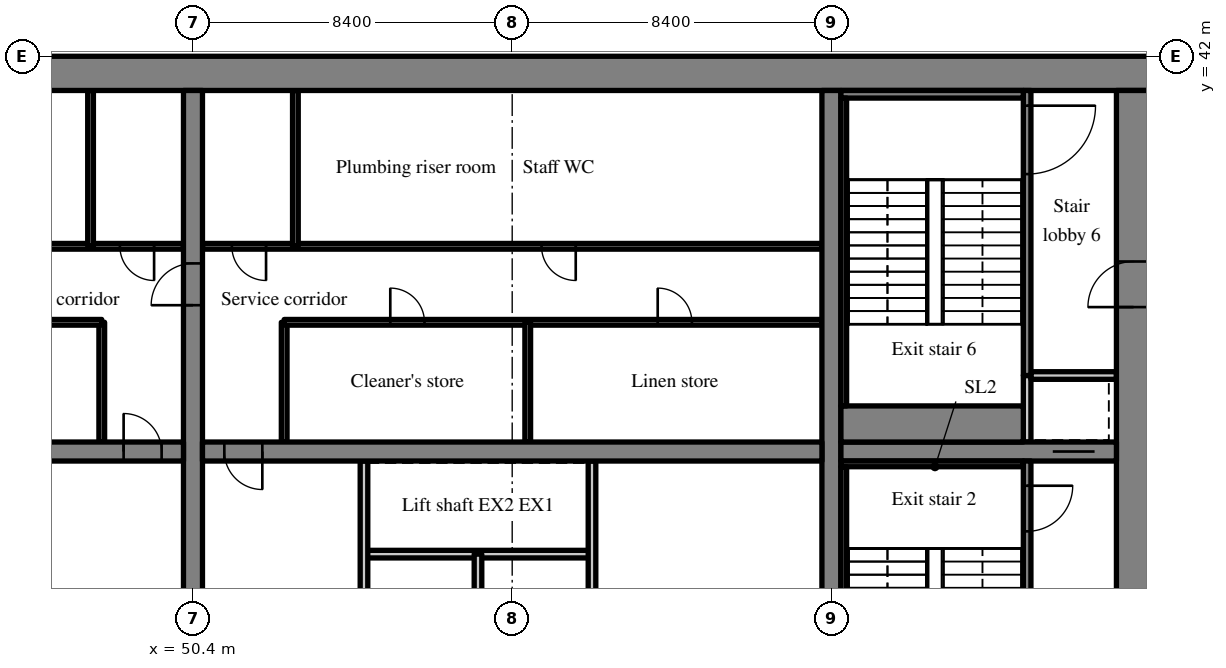
"""IFC4 building model, lengths in metres.
Left out: names, types, materials, properties, quantities, classifications, styles, units other than length and angle.
Written with IfcOpenShell. Run it as: python <this file> out.ifc"""

import sys

from ifc_helpers import new_model, si_unit, direction, frame, frame_2d, origin, place, context, subcontext, project, spatial, rectangle, extrude, source, transform, mapped, element, fill, save


model = new_model("IFC4")
c1 = context("Model", 3, precision=1e-05, world=origin(), true_north=direction((0.0, 1.0)))
c2 = subcontext(c1, "Body", "Model", "MODEL_VIEW")
j1 = project(units=[si_unit("LENGTHUNIT", "METRE"), si_unit("PLANEANGLEUNIT", "RADIAN")], contexts=[c1])
p1 = place(None, origin())
s1 = spatial("IfcSite", under=j1, at=p1, CompositionType="ELEMENT")
p2 = place(p1, origin())
s2 = spatial("IfcBuilding", under=s1, at=p2, CompositionType="ELEMENT")
p3 = place(p2, frame((0.0, 0.0, 125.6)))
s3 = spatial("IfcBuildingStorey", under=s2, at=p3, CompositionType="ELEMENT", Elevation=125.6)
m1 = source(origin(), c2, "Body", "SweptSolid", [
    extrude(rectangle(XDim=50.4, YDim=0.9, at=frame_2d((25.2, 0.0))), origin(), (0.0, 0.0, 1.0), 3.52),
])
p4 = place(p3, frame((25.2, 41.55, 0.0), z_axis=(0.0, 0.0, 1.0), x_axis=(1.0, 0.0, 0.0)))
e1 = element("IfcWall", 1, at=p4, inside=s3, PredefinedType="SHEAR", context=c2, shape_type="MappedRepresentation", body=[
    mapped(m1, transform((0.0, 0.0, 0.0), scale=1.0)),
])
m2 = source(origin(), c2, "Body", "SweptSolid", [
    extrude(rectangle(XDim=18.2, YDim=0.9, at=frame_2d((9.1, 0.0))), origin(), (0.0, 0.0, 1.0), 3.52),
])
p5 = place(p3, frame((75.15, 22.9, 0.0), z_axis=(0.0, 0.0, 1.0), x_axis=(0.0, 1.0, 0.0)))
e2 = element("IfcWall", 2, at=p5, inside=s3, PredefinedType="SHEAR", context=c2, shape_type="MappedRepresentation", body=[
    mapped(m2, transform((0.0, 0.0, 0.0), scale=1.0)),
])
m3 = source(origin(), c2, "Body", "SweptSolid", [
    extrude(rectangle(XDim=1.2, YDim=2.1, at=frame_2d((0.6, 1.05))), frame((0.0, 0.46, 0.0), z_axis=(0.0, -1.0, 0.0), x_axis=(1.0, 0.0, 0.0)), (0.0, 0.0, 1.0), 0.92),
])
p6 = place(p5, frame((12.5, 0.0, 0.0)))
e3 = element("IfcOpeningElement", 3, at=p6, cuts=e2, PredefinedType="OPENING", context=c2, shape_type="MappedRepresentation", body=[
    mapped(m3, transform((0.0, 0.0, 0.0), scale=1.0)),
])
m4 = source(origin(), c2, "Body", "SweptSolid", [
    extrude(rectangle(XDim=18.2, YDim=0.5, at=frame_2d((9.1, 0.0))), origin(), (0.0, 0.0, 1.0), 3.52),
])
p7 = place(p3, frame((50.4, 22.9, 0.0), z_axis=(0.0, 0.0, 1.0), x_axis=(0.0, 1.0, 0.0)))
e4 = element("IfcWall", 4, at=p7, inside=s3, PredefinedType="SHEAR", context=c2, shape_type="MappedRepresentation", body=[
    mapped(m4, transform((0.0, 0.0, 0.0), scale=1.0)),
])
m5 = source(origin(), c2, "Body", "SweptSolid", [
    extrude(rectangle(XDim=1.1, YDim=2.1, at=frame_2d((0.55, 1.05))), frame((0.0, 0.26, 0.0), z_axis=(0.0, -1.0, 0.0), x_axis=(1.0, 0.0, 0.0)), (0.0, 0.0, 1.0), 0.52),
])
p8 = place(p7, frame((12.55, 0.0, 0.0)))
e5 = element("IfcOpeningElement", 5, at=p8, cuts=e4, PredefinedType="OPENING", context=c2, shape_type="MappedRepresentation", body=[
    mapped(m5, transform((0.0, 0.0, 0.0), scale=1.0)),
])
p9 = place(p3, frame((67.2, 22.9, 0.0), z_axis=(0.0, 0.0, 1.0), x_axis=(0.0, 1.0, 0.0)))
e6 = element("IfcWall", 6, at=p9, inside=s3, PredefinedType="SHEAR", context=c2, shape_type="MappedRepresentation", body=[
    mapped(m4, transform((0.0, 0.0, 0.0), scale=1.0)),
])
m6 = source(origin(), c2, "Body", "SweptSolid", [
    extrude(rectangle(XDim=16.3, YDim=0.5, at=frame_2d((8.15, 0.0))), origin(), (0.0, 0.0, 1.0), 3.52),
])
p10 = place(p3, frame((33.85, 31.6, 0.0), z_axis=(0.0, 0.0, 1.0), x_axis=(1.0, 0.0, 0.0)))
e7 = element("IfcWall", 7, at=p10, inside=s3, PredefinedType="SHEAR", context=c2, shape_type="MappedRepresentation", body=[
    mapped(m6, transform((0.0, 0.0, 0.0), scale=1.0)),
])
m7 = source(origin(), c2, "Body", "SweptSolid", [
    extrude(rectangle(XDim=1.0, YDim=2.1, at=frame_2d((0.5, 1.05))), frame((0.0, 0.26, 0.0), z_axis=(0.0, -1.0, 0.0), x_axis=(1.0, 0.0, 0.0)), (0.0, 0.0, 1.0), 0.52),
])
p11 = place(p10, frame((14.725, 0.0, 0.0)))
e8 = element("IfcOpeningElement", 8, at=p11, cuts=e7, PredefinedType="OPENING", context=c2, shape_type="MappedRepresentation", body=[
    mapped(m7, transform((0.0, 0.0, 0.0), scale=1.0)),
])
m8 = source(origin(), c2, "Body", "SweptSolid", [
    extrude(rectangle(XDim=16.3, YDim=0.5, at=frame_2d((8.15, 0.0))), origin(), (0.0, 0.0, 1.0), 3.52),
])
p12 = place(p3, frame((50.65, 31.6, 0.0), z_axis=(0.0, 0.0, 1.0), x_axis=(1.0, 0.0, 0.0)))
e9 = element("IfcWall", 9, at=p12, inside=s3, PredefinedType="SHEAR", context=c2, shape_type="MappedRepresentation", body=[
    mapped(m8, transform((0.0, 0.0, 0.0), scale=1.0)),
])
p13 = place(p12, frame((0.575, 0.0, 0.0)))
e10 = element("IfcOpeningElement", 10, at=p13, cuts=e9, PredefinedType="OPENING", context=c2, shape_type="MappedRepresentation", body=[
    mapped(m7, transform((0.0, 0.0, 0.0), scale=1.0)),
])
m9 = source(origin(), c2, "Body", "SweptSolid", [
    extrude(rectangle(XDim=7.25, YDim=0.5, at=frame_2d((3.625, 0.0))), origin(), (0.0, 0.0, 1.0), 3.52),
])
p14 = place(p3, frame((67.45, 31.6, 0.0), z_axis=(0.0, 0.0, 1.0), x_axis=(1.0, 0.0, 0.0)))
e11 = element("IfcWall", 11, at=p14, inside=s3, PredefinedType="SHEAR", context=c2, shape_type="MappedRepresentation", body=[
    mapped(m9, transform((0.0, 0.0, 0.0), scale=1.0)),
])
p15 = place(p14, frame((5.575, 0.0, 0.0)))
e12 = element("IfcOpeningElement", 12, at=p15, cuts=e11, PredefinedType="OPENING", context=c2, shape_type="MappedRepresentation", body=[
    mapped(m5, transform((0.0, 0.0, 0.0), scale=1.0)),
])
m10 = source(origin(), c2, "Body", "SweptSolid", [
    extrude(rectangle(XDim=3.559, YDim=0.3, at=frame_2d((1.78, 0.0))), origin(), (0.0, 0.0, 1.0), 3.52),
])
p16 = place(p3, frame((76.523, 43.292, 0.0), z_axis=(0.0, 0.0, 1.0), x_axis=(-0.35779745313, -0.933799219604, 0.0)))
e13 = element("IfcWall", 13, at=p16, inside=s3, PredefinedType="SOLIDWALL", context=c2, shape_type="MappedRepresentation", body=[
    mapped(m10, transform((0.0, 0.0, 0.0), scale=1.0)),
])
m11 = source(origin(), c2, "Body", "SweptSolid", [
    extrude(rectangle(XDim=1.5, YDim=2.0, at=frame_2d((0.75, 1.0))), frame((0.0, 0.16, 0.0), z_axis=(0.0, -1.0, 0.0), x_axis=(1.0, 0.0, 0.0)), (0.0, 0.0, 1.0), 0.32),
])
p17 = place(p16, frame((0.156, 0.0, 0.9)))
e14 = element("IfcOpeningElement", 14, at=p17, cuts=e13, PredefinedType="OPENING", context=c2, shape_type="MappedRepresentation", body=[
    mapped(m11, transform((0.0, 0.0, 0.0), scale=1.0)),
])
m12 = source(origin(), c2, "Body", "SweptSolid", [
    extrude(rectangle(XDim=3.15, YDim=0.15, at=frame_2d((1.575, 0.0))), origin(), (0.0, 0.0, 1.0), 3.52),
])
p18 = place(p3, frame((48.0, 31.85, 0.0), z_axis=(0.0, 0.0, 1.0), x_axis=(0.0, 1.0, 0.0)))
e15 = element("IfcWall", 15, at=p18, inside=s3, PredefinedType="PARTITIONING", context=c2, shape_type="MappedRepresentation", body=[
    mapped(m12, transform((0.0, 0.0, 0.0), scale=1.0)),
])
m13 = source(origin(), c2, "Body", "SweptSolid", [
    extrude(rectangle(XDim=14.15, YDim=0.15, at=frame_2d((7.075, 0.0))), origin(), (0.0, 0.0, 1.0), 3.52),
])
p19 = place(p3, frame((33.85, 35.0, 0.0), z_axis=(0.0, 0.0, 1.0), x_axis=(1.0, 0.0, 0.0)))
e16 = element("IfcWall", 16, at=p19, inside=s3, PredefinedType="PARTITIONING", context=c2, shape_type="MappedRepresentation", body=[
    mapped(m13, transform((0.0, 0.0, 0.0), scale=1.0)),
])
m14 = source(origin(), c2, "Body", "SweptSolid", [
    extrude(rectangle(XDim=0.9, YDim=2.1, at=frame_2d((0.45, 1.05))), frame((0.0, 0.085, 0.0), z_axis=(0.0, -1.0, 0.0), x_axis=(1.0, 0.0, 0.0)), (0.0, 0.0, 1.0), 0.17),
])
p20 = place(p19, frame((6.588, 0.0, 0.0)))
e17 = element("IfcOpeningElement", 17, at=p20, cuts=e16, PredefinedType="OPENING", context=c2, shape_type="MappedRepresentation", body=[
    mapped(m14, transform((0.0, 0.0, 0.0), scale=1.0)),
])
m15 = source(origin(), c2, "Body", "SweptSolid", [
    extrude(rectangle(XDim=16.3, YDim=0.15, at=frame_2d((8.15, 0.0))), origin(), (0.0, 0.0, 1.0), 3.52),
])
p21 = place(p3, frame((33.85, 37.0, 0.0), z_axis=(0.0, 0.0, 1.0), x_axis=(1.0, 0.0, 0.0)))
e18 = element("IfcWall", 18, at=p21, inside=s3, PredefinedType="PARTITIONING", context=c2, shape_type="MappedRepresentation", body=[
    mapped(m15, transform((0.0, 0.0, 0.0), scale=1.0)),
])
p22 = place(p21, frame((0.773, 0.0, 0.0)))
e19 = element("IfcOpeningElement", 19, at=p22, cuts=e18, PredefinedType="OPENING", context=c2, shape_type="MappedRepresentation", body=[
    mapped(m14, transform((0.0, 0.0, 0.0), scale=1.0)),
])
p23 = place(p21, frame((3.625, 0.0, 0.0)))
e20 = element("IfcOpeningElement", 20, at=p23, cuts=e18, PredefinedType="OPENING", context=c2, shape_type="MappedRepresentation", body=[
    mapped(m14, transform((0.0, 0.0, 0.0), scale=1.0)),
])
p24 = place(p21, frame((9.33, 0.0, 0.0)))
e21 = element("IfcOpeningElement", 21, at=p24, cuts=e18, PredefinedType="OPENING", context=c2, shape_type="MappedRepresentation", body=[
    mapped(m14, transform((0.0, 0.0, 0.0), scale=1.0)),
])
p25 = place(p21, frame((14.627, 0.0, 0.0)))
e22 = element("IfcOpeningElement", 22, at=p25, cuts=e18, PredefinedType="OPENING", context=c2, shape_type="MappedRepresentation", body=[
    mapped(m14, transform((0.0, 0.0, 0.0), scale=1.0)),
])
m16 = source(origin(), c2, "Body", "SweptSolid", [
    extrude(rectangle(XDim=4.1, YDim=0.15, at=frame_2d((2.05, 0.0))), origin(), (0.0, 0.0, 1.0), 3.52),
])
p26 = place(p3, frame((47.705, 37.0, 0.0), z_axis=(0.0, 0.0, 1.0), x_axis=(0.0, 1.0, 0.0)))
e23 = element("IfcWall", 23, at=p26, inside=s3, PredefinedType="PARTITIONING", context=c2, shape_type="MappedRepresentation", body=[
    mapped(m16, transform((0.0, 0.0, 0.0), scale=1.0)),
])
m17 = source(origin(), c2, "Body", "SweptSolid", [
    extrude(rectangle(XDim=6.0, YDim=0.2, at=frame_2d((3.0, 0.0))), origin(), (0.0, 0.0, 1.0), 3.52),
])
p27 = place(p3, frame((60.9, 28.9, 0.0), z_axis=(0.0, 0.0, 1.0), x_axis=(-1.0, 0.0, 0.0)))
e24 = element("IfcWall", 24, at=p27, inside=s3, PredefinedType="SOLIDWALL", context=c2, shape_type="MappedRepresentation", body=[
    mapped(m17, transform((0.0, 0.0, 0.0), scale=1.0)),
])
m18 = source(origin(), c2, "Body", "SweptSolid", [
    extrude(rectangle(XDim=8.45, YDim=0.2, at=frame_2d((4.225, 0.0))), origin(), (0.0, 0.0, 1.0), 3.52),
])
for number, where, z_axis, x_axis in (
    (25, (54.9, 22.9, 0.0), (0.0, 0.0, 1.0), (0.0, 1.0, 0.0)),
    (26, (60.9, 22.9, 0.0), (0.0, 0.0, 1.0), (0.0, 1.0, 0.0)),
):
    element("IfcWall", number, at=place(p3, frame(where, z_axis=z_axis, x_axis=x_axis)), inside=s3, PredefinedType="PARTITIONING", context=c2, shape_type="MappedRepresentation", body=[
        mapped(m18, transform((0.0, 0.0, 0.0), scale=1.0)),
    ])
p28 = place(p3, frame((57.9, 22.9, 0.0), z_axis=(0.0, 0.0, 1.0), x_axis=(0.0, 1.0, 0.0)))
e27 = element("IfcWall", 27, at=p28, inside=s3, PredefinedType="PARTITIONING", context=c2, shape_type="MappedRepresentation", body=[
    mapped(m17, transform((0.0, 0.0, 0.0), scale=1.0)),
])
p29 = place(p3, frame((52.8, 31.85, 0.0), z_axis=(0.0, 0.0, 1.0), x_axis=(0.0, 1.0, 0.0)))
e28 = element("IfcWall", 28, at=p29, inside=s3, PredefinedType="PARTITIONING", context=c2, shape_type="MappedRepresentation", body=[
    mapped(m12, transform((0.0, 0.0, 0.0), scale=1.0)),
])
p30 = place(p3, frame((66.95, 35.0, 0.0), z_axis=(0.0, 0.0, 1.0), x_axis=(-1.0, 0.0, 0.0)))
e29 = element("IfcWall", 29, at=p30, inside=s3, PredefinedType="PARTITIONING", context=c2, shape_type="MappedRepresentation", body=[
    mapped(m13, transform((0.0, 0.0, 0.0), scale=1.0)),
])
p31 = place(p30, frame((3.421, 0.0, 0.0)))
e30 = element("IfcOpeningElement", 30, at=p31, cuts=e29, PredefinedType="OPENING", context=c2, shape_type="MappedRepresentation", body=[
    mapped(m14, transform((0.0, 0.0, 0.0), scale=1.0)),
])
p32 = place(p30, frame((10.458, 0.0, 0.0)))
e31 = element("IfcOpeningElement", 31, at=p32, cuts=e29, PredefinedType="OPENING", context=c2, shape_type="MappedRepresentation", body=[
    mapped(m14, transform((0.0, 0.0, 0.0), scale=1.0)),
])
m19 = source(origin(), c2, "Body", "SweptSolid", [
    extrude(rectangle(XDim=16.3, YDim=0.15, at=frame_2d((8.15, 0.0))), origin(), (0.0, 0.0, 1.0), 3.52),
])
p33 = place(p3, frame((66.95, 37.0, 0.0), z_axis=(0.0, 0.0, 1.0), x_axis=(-1.0, 0.0, 0.0)))
e32 = element("IfcWall", 32, at=p33, inside=s3, PredefinedType="PARTITIONING", context=c2, shape_type="MappedRepresentation", body=[
    mapped(m19, transform((0.0, 0.0, 0.0), scale=1.0)),
])
p34 = place(p33, frame((6.478, 0.0, 0.0)))
e33 = element("IfcOpeningElement", 33, at=p34, cuts=e32, PredefinedType="OPENING", context=c2, shape_type="MappedRepresentation", body=[
    mapped(m14, transform((0.0, 0.0, 0.0), scale=1.0)),
])
p35 = place(p33, frame((14.627, 0.0, 0.0)))
e34 = element("IfcOpeningElement", 34, at=p35, cuts=e32, PredefinedType="OPENING", context=c2, shape_type="MappedRepresentation", body=[
    mapped(m14, transform((0.0, 0.0, 0.0), scale=1.0)),
])
p36 = place(p3, frame((59.209, 31.85, 0.0), z_axis=(0.0, 0.0, 1.0), x_axis=(0.0, 1.0, 0.0)))
e35 = element("IfcWall", 35, at=p36, inside=s3, PredefinedType="PARTITIONING", context=c2, shape_type="MappedRepresentation", body=[
    mapped(m12, transform((0.0, 0.0, 0.0), scale=1.0)),
])
p37 = place(p3, frame((53.095, 37.0, 0.0), z_axis=(0.0, 0.0, 1.0), x_axis=(0.0, 1.0, 0.0)))
e36 = element("IfcWall", 36, at=p37, inside=s3, PredefinedType="PARTITIONING", context=c2, shape_type="MappedRepresentation", body=[
    mapped(m16, transform((0.0, 0.0, 0.0), scale=1.0)),
])
m20 = source(origin(), c2, "Body", "SweptSolid", [
    extrude(rectangle(XDim=8.45, YDim=0.2, at=frame_2d((4.225, 0.0))), origin(), (0.0, 0.0, 1.0), 3.52),
])
p38 = place(p3, frame((72.35, 22.9, 0.0), z_axis=(0.0, 0.0, 1.0), x_axis=(0.0, 1.0, 0.0)))
e37 = element("IfcWall", 37, at=p38, inside=s3, PredefinedType="SOLIDWALL", context=c2, shape_type="MappedRepresentation", body=[
    mapped(m20, transform((0.0, 0.0, 0.0), scale=1.0)),
])
m21 = source(origin(), c2, "Body", "SweptSolid", [
    extrude(rectangle(XDim=1.2, YDim=2.1, at=frame_2d((0.6, 1.05))), frame((0.0, 0.11, 0.0), z_axis=(0.0, -1.0, 0.0), x_axis=(1.0, 0.0, 0.0)), (0.0, 0.0, 1.0), 0.22),
])
p39 = place(p38, frame((6.6, 0.0, 0.0)))
e38 = element("IfcOpeningElement", 38, at=p39, cuts=e37, PredefinedType="OPENING", context=c2, shape_type="MappedRepresentation", body=[
    mapped(m21, transform((0.0, 0.0, 0.0), scale=1.0)),
])
m22 = source(origin(), c2, "Body", "SweptSolid", [
    extrude(rectangle(XDim=1.75, YDim=0.2, at=frame_2d((0.875, 0.0))), origin(), (0.0, 0.0, 1.0), 3.52),
])
p40 = place(p3, frame((72.35, 31.85, 0.0), z_axis=(0.0, 0.0, 1.0), x_axis=(0.0, 1.0, 0.0)))
e39 = element("IfcWall", 39, at=p40, inside=s3, PredefinedType="SOLIDWALL", context=c2, shape_type="MappedRepresentation", body=[
    mapped(m22, transform((0.0, 0.0, 0.0), scale=1.0)),
])
m23 = source(origin(), c2, "Body", "SweptSolid", [
    extrude(rectangle(XDim=2.25, YDim=0.2, at=frame_2d((1.125, 0.0))), origin(), (0.0, 0.0, 1.0), 3.52),
])
p41 = place(p3, frame((72.45, 33.6, 0.0), z_axis=(0.0, 0.0, 1.0), x_axis=(1.0, 0.0, 0.0)))
e40 = element("IfcWall", 40, at=p41, inside=s3, PredefinedType="SOLIDWALL", context=c2, shape_type="MappedRepresentation", body=[
    mapped(m23, transform((0.0, 0.0, 0.0), scale=1.0)),
])
m24 = source(origin(), c2, "Body", "SweptSolid", [
    extrude(rectangle(XDim=7.5, YDim=0.2, at=frame_2d((3.75, 0.0))), origin(), (0.0, 0.0, 1.0), 3.52),
])
p42 = place(p3, frame((72.35, 33.6, 0.0), z_axis=(0.0, 0.0, 1.0), x_axis=(0.0, 1.0, 0.0)))
e41 = element("IfcWall", 41, at=p42, inside=s3, PredefinedType="SOLIDWALL", context=c2, shape_type="MappedRepresentation", body=[
    mapped(m24, transform((0.0, 0.0, 0.0), scale=1.0)),
])
m25 = source(origin(), c2, "Body", "SweptSolid", [
    extrude(rectangle(XDim=1.8, YDim=2.1, at=frame_2d((0.9, 1.05))), frame((0.0, 0.11, 0.0), z_axis=(0.0, -1.0, 0.0), x_axis=(1.0, 0.0, 0.0)), (0.0, 0.0, 1.0), 0.22),
])
p43 = place(p42, frame((5.3, 0.0, 0.0)))
e42 = element("IfcOpeningElement", 42, at=p43, cuts=e41, PredefinedType="OPENING", context=c2, shape_type="MappedRepresentation", body=[
    mapped(m25, transform((0.0, 0.0, 0.0), scale=1.0)),
])
m26 = source(origin(), c2, "Body", "SweptSolid", [
    extrude(rectangle(XDim=4.8, YDim=0.15, at=frame_2d((2.4, 0.0))), origin(), (0.0, 0.0, 1.0), 3.52),
])
p44 = place(p3, frame((67.45, 31.275, 0.0), z_axis=(0.0, 0.0, 1.0), x_axis=(1.0, 0.0, 0.0)))
e43 = element("IfcWall", 43, at=p44, inside=s3, PredefinedType="SOLIDWALL", context=c2, shape_type="MappedRepresentation", body=[
    mapped(m26, transform((0.0, 0.0, 0.0), scale=1.0)),
])
m27 = source(origin(), c2, "Body", "SweptSolid", [
    extrude(rectangle(XDim=8.1, YDim=0.15, at=frame_2d((4.05, 0.0))), origin(), (0.0, 0.0, 1.0), 3.52),
])
p45 = place(p3, frame((67.525, 23.1, 0.0), z_axis=(0.0, 0.0, 1.0), x_axis=(0.0, 1.0, 0.0)))
e44 = element("IfcWall", 44, at=p45, inside=s3, PredefinedType="SOLIDWALL", context=c2, shape_type="MappedRepresentation", body=[
    mapped(m27, transform((0.0, 0.0, 0.0), scale=1.0)),
])
m28 = source(origin(), c2, "Body", "SweptSolid", [
    extrude(rectangle(XDim=4.8, YDim=0.2, at=frame_2d((2.4, 0.0))), origin(), (0.0, 0.0, 1.0), 3.52),
])
p46 = place(p3, frame((67.45, 41.0, 0.0), z_axis=(0.0, 0.0, 1.0), x_axis=(1.0, 0.0, 0.0)))
e45 = element("IfcWall", 45, at=p46, inside=s3, PredefinedType="SOLIDWALL", context=c2, shape_type="MappedRepresentation", body=[
    mapped(m28, transform((0.0, 0.0, 0.0), scale=1.0)),
])
m29 = source(origin(), c2, "Body", "SweptSolid", [
    extrude(rectangle(XDim=4.8, YDim=0.95, at=frame_2d((2.4, 0.0))), origin(), (0.0, 0.0, 1.0), 3.52),
])
p47 = place(p3, frame((67.45, 32.325, 0.0), z_axis=(0.0, 0.0, 1.0), x_axis=(1.0, 0.0, 0.0)))
e46 = element("IfcWall", 46, at=p47, inside=s3, PredefinedType="SOLIDWALL", context=c2, shape_type="MappedRepresentation", body=[
    mapped(m29, transform((0.0, 0.0, 0.0), scale=1.0)),
])
p48 = place(p3, frame((67.525, 32.8, 0.0), z_axis=(0.0, 0.0, 1.0), x_axis=(0.0, 1.0, 0.0)))
e47 = element("IfcWall", 47, at=p48, inside=s3, PredefinedType="SOLIDWALL", context=c2, shape_type="MappedRepresentation", body=[
    mapped(m27, transform((0.0, 0.0, 0.0), scale=1.0)),
])
m30 = source(origin(), c2, "Body", "SweptSolid", [
    extrude(rectangle(XDim=1.0, YDim=2.1, at=frame_2d((0.5, 1.05))), frame((0.0, 0.025, 0.0), z_axis=(0.0, -1.0, 0.0), x_axis=(1.0, 0.0, 0.0)), (0.0, 0.0, 1.0), 0.05),
])
p49 = place(p11, origin())
e48 = element("IfcDoor", 48, at=p49, inside=s3, OperationType="SINGLE_SWING_LEFT", PredefinedType="DOOR", context=c2, shape_type="MappedRepresentation", body=[
    mapped(m30, transform((0.0, 0.0, 0.0), scale=1.0)),
])
fill(e8, e48)
m31 = source(origin(), c2, "Body", "SweptSolid", [
    extrude(rectangle(XDim=0.9, YDim=2.1, at=frame_2d((0.45, 1.05))), frame((0.0, 0.025, 0.0), z_axis=(0.0, -1.0, 0.0), x_axis=(1.0, 0.0, 0.0)), (0.0, 0.0, 1.0), 0.05),
])
p50 = place(p25, origin())
e49 = element("IfcDoor", 49, at=p50, inside=s3, OperationType="SINGLE_SWING_RIGHT", PredefinedType="DOOR", context=c2, shape_type="MappedRepresentation", body=[
    mapped(m31, transform((0.0, 0.0, 0.0), scale=1.0)),
])
fill(e22, e49)
p51 = place(p13, origin())
e50 = element("IfcDoor", 50, at=p51, inside=s3, OperationType="SINGLE_SWING_RIGHT", PredefinedType="DOOR", context=c2, shape_type="MappedRepresentation", body=[
    mapped(m30, transform((0.0, 0.0, 0.0), scale=1.0)),
])
fill(e10, e50)
p52 = place(p31, origin())
e51 = element("IfcDoor", 51, at=p52, inside=s3, OperationType="SINGLE_SWING_RIGHT", PredefinedType="DOOR", context=c2, shape_type="MappedRepresentation", body=[
    mapped(m31, transform((0.0, 0.0, 0.0), scale=1.0)),
])
fill(e30, e51)
p53 = place(p32, origin())
e52 = element("IfcDoor", 52, at=p53, inside=s3, OperationType="SINGLE_SWING_RIGHT", PredefinedType="DOOR", context=c2, shape_type="MappedRepresentation", body=[
    mapped(m31, transform((0.0, 0.0, 0.0), scale=1.0)),
])
fill(e31, e52)
p54 = place(p34, origin())
e53 = element("IfcDoor", 53, at=p54, inside=s3, OperationType="SINGLE_SWING_LEFT", PredefinedType="DOOR", context=c2, shape_type="MappedRepresentation", body=[
    mapped(m31, transform((0.0, 0.0, 0.0), scale=1.0)),
])
fill(e33, e53)
p55 = place(p35, origin())
e54 = element("IfcDoor", 54, at=p55, inside=s3, OperationType="SINGLE_SWING_LEFT", PredefinedType="DOOR", context=c2, shape_type="MappedRepresentation", body=[
    mapped(m31, transform((0.0, 0.0, 0.0), scale=1.0)),
])
fill(e34, e54)
m32 = source(origin(), c2, "Body", "SweptSolid", [
    extrude(rectangle(XDim=1.2, YDim=2.1, at=frame_2d((0.6, 1.05))), frame((0.0, 0.025, 0.0), z_axis=(0.0, -1.0, 0.0), x_axis=(1.0, 0.0, 0.0)), (0.0, 0.0, 1.0), 0.05),
])
p56 = place(p39, origin())
e55 = element("IfcDoor", 55, at=p56, inside=s3, OperationType="SINGLE_SWING_RIGHT", PredefinedType="DOOR", context=c2, shape_type="MappedRepresentation", body=[
    mapped(m32, transform((0.0, 0.0, 0.0), scale=1.0)),
])
fill(e38, e55)
m33 = source(origin(), c2, "Body", "SweptSolid", [
    extrude(rectangle(XDim=1.1, YDim=2.1, at=frame_2d((0.55, 1.05))), frame((0.0, 0.025, 0.0), z_axis=(0.0, -1.0, 0.0), x_axis=(1.0, 0.0, 0.0)), (0.0, 0.0, 1.0), 0.05),
])
p57 = place(p15, origin())
e56 = element("IfcDoor", 56, at=p57, inside=s3, OperationType="SLIDING_TO_LEFT", PredefinedType="DOOR", context=c2, shape_type="MappedRepresentation", body=[
    mapped(m33, transform((0.0, 0.0, 0.0), scale=1.0)),
])
fill(e12, e56)
m34 = source(origin(), c2, "Body", "SweptSolid", [
    extrude(rectangle(XDim=1.8, YDim=2.1, at=frame_2d((0.9, 1.05))), frame((0.0, 0.025, 0.0), z_axis=(0.0, -1.0, 0.0), x_axis=(1.0, 0.0, 0.0)), (0.0, 0.0, 1.0), 0.05),
])
p58 = place(p43, origin())
e57 = element("IfcDoor", 57, at=p58, inside=s3, OperationType="SINGLE_SWING_RIGHT", PredefinedType="DOOR", context=c2, shape_type="MappedRepresentation", body=[
    mapped(m34, transform((0.0, 0.0, 0.0), scale=1.0)),
])
fill(e42, e57)
p59 = place(p6, origin())
e58 = element("IfcDoor", 58, at=p59, inside=s3, OperationType="SINGLE_SWING_LEFT", PredefinedType="DOOR", context=c2, shape_type="MappedRepresentation", body=[
    mapped(m32, transform((0.0, 0.0, 0.0), scale=1.0)),
])
fill(e3, e58)
p60 = place(p8, origin())
e59 = element("IfcDoor", 59, at=p60, inside=s3, OperationType="SINGLE_SWING_LEFT", PredefinedType="DOOR", context=c2, shape_type="MappedRepresentation", body=[
    mapped(m33, transform((0.0, 0.0, 0.0), scale=1.0)),
])
fill(e5, e59)
save(model, sys.argv[1])
